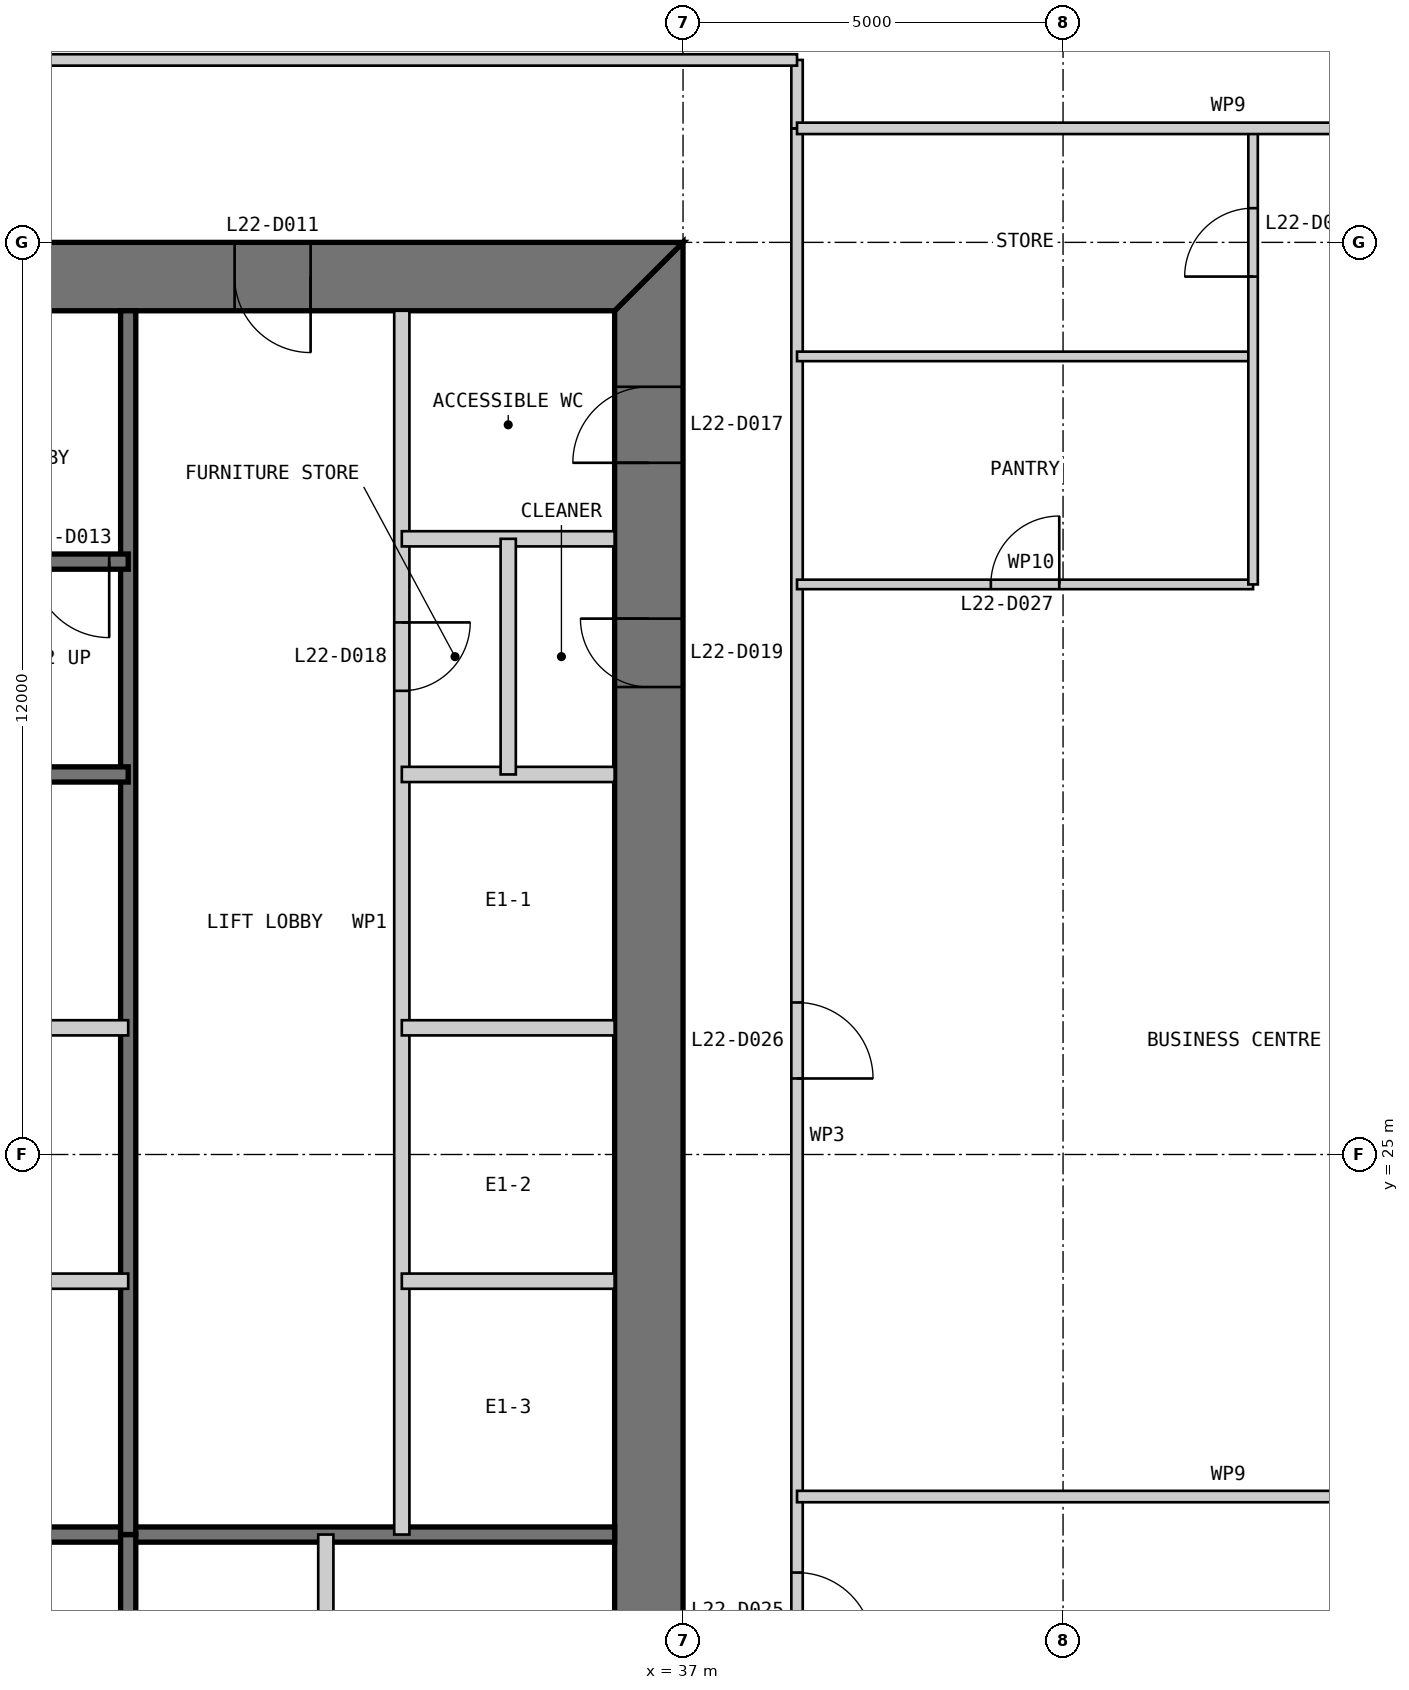
"""IFC4 building model, lengths in metres.
Left out: names, types, materials, properties, quantities, classifications, styles, units other than length and angle.
Written with IfcOpenShell. Run it as: python <this file> out.ifc"""

import sys

from ifc_helpers import new_model, si_unit, direction, frame, frame_2d, origin, place, context, subcontext, project, spatial, polyline, rectangle, outline, extrude, element, fill, save


model = new_model("IFC4")
c1 = context("Model", 3, precision=1e-05, world=origin(), true_north=direction((0.0, 1.0)))
c2 = subcontext(c1, "Body", "Model", "MODEL_VIEW")
j1 = project(units=[si_unit("LENGTHUNIT", "METRE"), si_unit("PLANEANGLEUNIT", "RADIAN")], contexts=[c1])
p1 = place(None, origin())
s1 = spatial("IfcSite", under=j1, at=p1, CompositionType="ELEMENT")
p2 = place(p1, origin())
s2 = spatial("IfcBuilding", under=s1, at=p2, CompositionType="ELEMENT")
p3 = place(p2, frame((0.0, 0.0, 97.0)))
s3 = spatial("IfcBuildingStorey", under=s2, at=p3, CompositionType="ELEMENT", Elevation=97.0)
p4 = place(p3, frame((36.55, 13.9, 0.0), z_axis=(0.0, 0.0, 1.0), x_axis=(0.0, 1.0, 0.0)))
e1 = element("IfcWall", 1, at=p4, inside=s3, PredefinedType="SHEAR", context=c2, shape_type="SweptSolid", body=[
    extrude(outline(polyline([(-0.9, -0.45), (23.1, -0.45), (22.2, 0.45), (0.0, 0.45), (-0.9, -0.45)])), origin(), (0.0, 0.0, 1.0), 5.4),
])
p5 = place(p4, frame((20.2, 0.0, 0.0)))
e2 = element("IfcOpeningElement", 2, at=p5, cuts=e1, PredefinedType="OPENING", context=c2, shape_type="SweptSolid", body=[
    extrude(rectangle(XDim=1.0, YDim=2.2, at=frame_2d((0.5, 1.1))), frame((0.0, 0.46, 0.0), z_axis=(0.0, -1.0, 0.0), x_axis=(1.0, 0.0, 0.0)), (0.0, 0.0, 1.0), 0.92),
])
p6 = place(p4, frame((17.25, 0.0, 0.0)))
e3 = element("IfcOpeningElement", 3, at=p6, cuts=e1, PredefinedType="OPENING", context=c2, shape_type="SweptSolid", body=[
    extrude(rectangle(XDim=0.9, YDim=2.2, at=frame_2d((0.45, 1.1))), frame((0.0, 0.46, 0.0), z_axis=(0.0, -1.0, 0.0), x_axis=(1.0, 0.0, 0.0)), (0.0, 0.0, 1.0), 0.92),
])
p7 = place(p3, frame((37.0, 36.55, 0.0), z_axis=(0.0, 0.0, 1.0), x_axis=(-1.0, 0.0, 0.0)))
e4 = element("IfcWall", 4, at=p7, inside=s3, PredefinedType="SHEAR", context=c2, shape_type="SweptSolid", body=[
    extrude(outline(polyline([(0.0, -0.45), (24.0, -0.45), (23.1, 0.45), (0.9, 0.45), (0.0, -0.45)])), origin(), (0.0, 0.0, 1.0), 5.4),
])
p8 = place(p7, frame((4.9, 0.0, 0.0)))
e5 = element("IfcOpeningElement", 5, at=p8, cuts=e4, PredefinedType="OPENING", context=c2, shape_type="SweptSolid", body=[
    extrude(rectangle(XDim=1.0, YDim=2.2, at=frame_2d((0.5, 1.1))), frame((0.0, 0.46, 0.0), z_axis=(0.0, -1.0, 0.0), x_axis=(1.0, 0.0, 0.0)), (0.0, 0.0, 1.0), 0.92),
])
p9 = place(p7, frame((8.9, 0.0, 0.0)))
e6 = element("IfcOpeningElement", 6, at=p9, cuts=e4, PredefinedType="OPENING", context=c2, shape_type="SweptSolid", body=[
    extrude(rectangle(XDim=1.1, YDim=2.2, at=frame_2d((0.55, 1.1))), frame((0.0, 0.46, 0.0), z_axis=(0.0, -1.0, 0.0), x_axis=(1.0, 0.0, 0.0)), (0.0, 0.0, 1.0), 0.92),
])
p10 = place(p7, frame((15.05, 0.0, 0.0)))
e7 = element("IfcOpeningElement", 7, at=p10, cuts=e4, PredefinedType="OPENING", context=c2, shape_type="SweptSolid", body=[
    extrude(rectangle(XDim=0.9, YDim=2.2, at=frame_2d((0.45, 1.1))), frame((0.0, 0.46, 0.0), z_axis=(0.0, -1.0, 0.0), x_axis=(1.0, 0.0, 0.0)), (0.0, 0.0, 1.0), 0.92),
])
p11 = place(p7, frame((17.9, 0.0, 0.0)))
e8 = element("IfcOpeningElement", 8, at=p11, cuts=e4, PredefinedType="OPENING", context=c2, shape_type="SweptSolid", body=[
    extrude(rectangle(XDim=1.0, YDim=2.2, at=frame_2d((0.5, 1.1))), frame((0.0, 0.46, 0.0), z_axis=(0.0, -1.0, 0.0), x_axis=(1.0, 0.0, 0.0)), (0.0, 0.0, 1.0), 0.92),
])
p12 = place(p7, frame((21.4, 0.0, 0.0)))
e9 = element("IfcOpeningElement", 9, at=p12, cuts=e4, PredefinedType="OPENING", context=c2, shape_type="SweptSolid", body=[
    extrude(rectangle(XDim=1.0, YDim=2.2, at=frame_2d((0.5, 1.1))), frame((0.0, 0.46, 0.0), z_axis=(0.0, -1.0, 0.0), x_axis=(1.0, 0.0, 0.0)), (0.0, 0.0, 1.0), 0.92),
])
p13 = place(p3, frame((20.3, 20.0, 0.0), z_axis=(0.0, 0.0, 1.0), x_axis=(1.0, 0.0, 0.0)))
e10 = element("IfcWall", 10, at=p13, inside=s3, PredefinedType="SOLIDWALL", context=c2, shape_type="SweptSolid", body=[
    extrude(rectangle(XDim=15.8, YDim=0.2, at=frame_2d((7.9, 0.0))), origin(), (0.0, 0.0, 1.0), 5.2),
])
p14 = place(p3, frame((29.7, 13.9, 0.0), z_axis=(0.0, 0.0, 1.0), x_axis=(0.0, 1.0, 0.0)))
e11 = element("IfcWall", 11, at=p14, inside=s3, PredefinedType="SOLIDWALL", context=c2, shape_type="SweptSolid", body=[
    extrude(rectangle(XDim=6.1, YDim=0.2, at=frame_2d((3.05, 0.0))), origin(), (0.0, 0.0, 1.0), 5.2),
])
p15 = place(p3, frame((32.3, 13.9, 0.0), z_axis=(0.0, 0.0, 1.0), x_axis=(0.0, 1.0, 0.0)))
e12 = element("IfcWall", 12, at=p15, inside=s3, PredefinedType="PARTITIONING", context=c2, shape_type="SweptSolid", body=[
    extrude(rectangle(XDim=6.1, YDim=0.2, at=frame_2d((3.05, 0.0))), origin(), (0.0, 0.0, 1.0), 5.2),
])
p16 = place(p3, frame((33.3, 36.1, 0.0), z_axis=(0.0, 0.0, 1.0), x_axis=(0.0, -1.0, 0.0)))
e13 = element("IfcWall", 13, at=p16, inside=s3, PredefinedType="PARTITIONING", context=c2, shape_type="SweptSolid", body=[
    extrude(rectangle(XDim=16.1, YDim=0.2, at=frame_2d((8.05, 0.0))), origin(), (0.0, 0.0, 1.0), 5.2),
])
p17 = place(p16, frame((4.1, 0.0, 0.0)))
e14 = element("IfcOpeningElement", 14, at=p17, cuts=e13, PredefinedType="OPENING", context=c2, shape_type="SweptSolid", body=[
    extrude(rectangle(XDim=0.9, YDim=2.2, at=frame_2d((0.45, 1.1))), frame((0.0, 0.11, 0.0), z_axis=(0.0, -1.0, 0.0), x_axis=(1.0, 0.0, 0.0)), (0.0, 0.0, 1.0), 0.22),
])
p18 = place(p3, frame((29.7, 36.1, 0.0), z_axis=(0.0, 0.0, 1.0), x_axis=(0.0, -1.0, 0.0)))
e15 = element("IfcWall", 15, at=p18, inside=s3, PredefinedType="SOLIDWALL", context=c2, shape_type="SweptSolid", body=[
    extrude(rectangle(XDim=16.1, YDim=0.2, at=frame_2d((8.05, 0.0))), origin(), (0.0, 0.0, 1.0), 5.2),
])
for number, where, z_axis, x_axis in (
    (16, (36.1, 30.0, 0.0), (0.0, 0.0, 1.0), (-1.0, 0.0, 0.0)),
    (17, (36.1, 26.667, 0.0), (0.0, 0.0, 1.0), (-1.0, 0.0, 0.0)),
    (18, (36.1, 23.333, 0.0), (0.0, 0.0, 1.0), (-1.0, 0.0, 0.0)),
    (19, (29.7, 26.667, 0.0), (0.0, 0.0, 1.0), (-1.0, 0.0, 0.0)),
    (20, (29.7, 23.333, 0.0), (0.0, 0.0, 1.0), (-1.0, 0.0, 0.0)),
):
    element("IfcWall", number, at=place(p3, frame(where, z_axis=z_axis, x_axis=x_axis)), inside=s3, PredefinedType="PARTITIONING", context=c2, shape_type="SweptSolid", body=[
        extrude(rectangle(XDim=2.8, YDim=0.2, at=frame_2d((1.4, 0.0))), origin(), (0.0, 0.0, 1.0), 5.2),
    ])
p19 = place(p3, frame((29.7, 32.8, 0.0), z_axis=(0.0, 0.0, 1.0), x_axis=(-1.0, 0.0, 0.0)))
e21 = element("IfcWall", 21, at=p19, inside=s3, PredefinedType="SOLIDWALL", context=c2, shape_type="SweptSolid", body=[
    extrude(rectangle(XDim=9.4, YDim=0.2, at=frame_2d((4.7, 0.0))), origin(), (0.0, 0.0, 1.0), 5.2),
])
p20 = place(p19, frame((0.25, 0.0, 0.0)))
e22 = element("IfcOpeningElement", 22, at=p20, cuts=e21, PredefinedType="OPENING", context=c2, shape_type="SweptSolid", body=[
    extrude(rectangle(XDim=1.0, YDim=2.2, at=frame_2d((0.5, 1.1))), frame((0.0, 0.11, 0.0), z_axis=(0.0, -1.0, 0.0), x_axis=(1.0, 0.0, 0.0)), (0.0, 0.0, 1.0), 0.22),
])
p21 = place(p3, frame((29.7, 30.0, 0.0), z_axis=(0.0, 0.0, 1.0), x_axis=(-1.0, 0.0, 0.0)))
e23 = element("IfcWall", 23, at=p21, inside=s3, PredefinedType="SOLIDWALL", context=c2, shape_type="SweptSolid", body=[
    extrude(rectangle(XDim=15.8, YDim=0.2, at=frame_2d((7.9, 0.0))), origin(), (0.0, 0.0, 1.0), 5.2),
])
p22 = place(p3, frame((36.1, 33.1, 0.0), z_axis=(0.0, 0.0, 1.0), x_axis=(-1.0, 0.0, 0.0)))
e24 = element("IfcWall", 24, at=p22, inside=s3, PredefinedType="PARTITIONING", context=c2, shape_type="SweptSolid", body=[
    extrude(rectangle(XDim=2.8, YDim=0.2, at=frame_2d((1.4, 0.0))), origin(), (0.0, 0.0, 1.0), 5.2),
])
p23 = place(p3, frame((34.7, 33.1, 0.0), z_axis=(0.0, 0.0, 1.0), x_axis=(0.0, -1.0, 0.0)))
e25 = element("IfcWall", 25, at=p23, inside=s3, PredefinedType="PARTITIONING", context=c2, shape_type="SweptSolid", body=[
    extrude(rectangle(XDim=3.1, YDim=0.2, at=frame_2d((1.55, 0.0))), origin(), (0.0, 0.0, 1.0), 5.2),
])
p24 = place(p3, frame((38.5, 11.5, 0.0), z_axis=(0.0, 0.0, 1.0), x_axis=(0.0, 1.0, 0.0)))
e26 = element("IfcWall", 26, at=p24, inside=s3, PredefinedType="PARTITIONING", context=c2, shape_type="SweptSolid", body=[
    extrude(rectangle(XDim=27.0, YDim=0.15, at=frame_2d((13.5, 0.0))), origin(), (0.0, 0.0, 1.0), 5.25),
])
p25 = place(p24, frame((3.25, 0.0, 0.0)))
e27 = element("IfcOpeningElement", 27, at=p25, cuts=e26, PredefinedType="OPENING", context=c2, shape_type="SweptSolid", body=[
    extrude(rectangle(XDim=1.0, YDim=2.2, at=frame_2d((0.5, 1.1))), frame((0.0, 0.085, 0.0), z_axis=(0.0, -1.0, 0.0), x_axis=(1.0, 0.0, 0.0)), (0.0, 0.0, 1.0), 0.17),
])
p26 = place(p24, frame((7.0, 0.0, 0.0)))
e28 = element("IfcOpeningElement", 28, at=p26, cuts=e26, PredefinedType="OPENING", context=c2, shape_type="SweptSolid", body=[
    extrude(rectangle(XDim=1.0, YDim=2.2, at=frame_2d((0.5, 1.1))), frame((0.0, 0.085, 0.0), z_axis=(0.0, -1.0, 0.0), x_axis=(1.0, 0.0, 0.0)), (0.0, 0.0, 1.0), 0.17),
])
p27 = place(p24, frame((14.5, 0.0, 0.0)))
e29 = element("IfcOpeningElement", 29, at=p27, cuts=e26, PredefinedType="OPENING", context=c2, shape_type="SweptSolid", body=[
    extrude(rectangle(XDim=1.0, YDim=2.2, at=frame_2d((0.5, 1.1))), frame((0.0, 0.085, 0.0), z_axis=(0.0, -1.0, 0.0), x_axis=(1.0, 0.0, 0.0)), (0.0, 0.0, 1.0), 0.17),
])
p28 = place(p3, frame((49.85, 20.5, 0.0), z_axis=(0.0, 0.0, 1.0), x_axis=(-1.0, 0.0, 0.0)))
e30 = element("IfcWall", 30, at=p28, inside=s3, PredefinedType="PARTITIONING", context=c2, shape_type="SweptSolid", body=[
    extrude(rectangle(XDim=11.35, YDim=0.15, at=frame_2d((5.675, 0.0))), origin(), (0.0, 0.0, 1.0), 5.25),
])
p29 = place(p3, frame((44.5, 32.5, 0.0), z_axis=(0.0, 0.0, 1.0), x_axis=(-1.0, 0.0, 0.0)))
e31 = element("IfcWall", 31, at=p29, inside=s3, PredefinedType="PARTITIONING", context=c2, shape_type="SweptSolid", body=[
    extrude(rectangle(XDim=6.0, YDim=0.125, at=frame_2d((3.0, 0.0))), origin(), (0.0, 0.0, 1.0), 5.25),
])
p30 = place(p29, frame((2.55, 0.0, 0.0)))
e32 = element("IfcOpeningElement", 32, at=p30, cuts=e31, PredefinedType="OPENING", context=c2, shape_type="SweptSolid", body=[
    extrude(rectangle(XDim=0.9, YDim=2.2, at=frame_2d((0.45, 1.1))), frame((0.0, 0.073, 0.0), z_axis=(0.0, -1.0, 0.0), x_axis=(1.0, 0.0, 0.0)), (0.0, 0.0, 1.0), 0.145),
])
p31 = place(p3, frame((44.5, 35.5, 0.0), z_axis=(0.0, 0.0, 1.0), x_axis=(-1.0, 0.0, 0.0)))
e33 = element("IfcWall", 33, at=p31, inside=s3, PredefinedType="PARTITIONING", context=c2, shape_type="SweptSolid", body=[
    extrude(rectangle(XDim=6.0, YDim=0.125, at=frame_2d((3.0, 0.0))), origin(), (0.0, 0.0, 1.0), 5.25),
])
p32 = place(p3, frame((44.5, 32.5, 0.0), z_axis=(0.0, 0.0, 1.0), x_axis=(0.0, 1.0, 0.0)))
e34 = element("IfcWall", 34, at=p32, inside=s3, PredefinedType="PARTITIONING", context=c2, shape_type="SweptSolid", body=[
    extrude(rectangle(XDim=6.0, YDim=0.125, at=frame_2d((3.0, 0.0))), origin(), (0.0, 0.0, 1.0), 5.25),
])
p33 = place(p32, frame((4.05, 0.0, 0.0)))
e35 = element("IfcOpeningElement", 35, at=p33, cuts=e34, PredefinedType="OPENING", context=c2, shape_type="SweptSolid", body=[
    extrude(rectangle(XDim=0.9, YDim=2.2, at=frame_2d((0.45, 1.1))), frame((0.0, 0.073, 0.0), z_axis=(0.0, -1.0, 0.0), x_axis=(1.0, 0.0, 0.0)), (0.0, 0.0, 1.0), 0.145),
])
p34 = place(p3, frame((38.5, 38.5, 0.0), z_axis=(0.0, 0.0, 1.0), x_axis=(0.0, 1.0, 0.0)))
e36 = element("IfcWall", 36, at=p34, inside=s3, PredefinedType="PARTITIONING", context=c2, shape_type="SweptSolid", body=[
    extrude(rectangle(XDim=0.9, YDim=0.15, at=frame_2d((0.45, 0.0))), origin(), (0.0, 0.0, 1.0), 5.25),
])
p35 = place(p3, frame((38.5, 39.4, 0.0), z_axis=(0.0, 0.0, 1.0), x_axis=(-1.0, 0.0, 0.0)))
e37 = element("IfcWall", 37, at=p35, inside=s3, PredefinedType="PARTITIONING", context=c2, shape_type="SweptSolid", body=[
    extrude(rectangle(XDim=27.0, YDim=0.15, at=frame_2d((13.5, 0.0))), origin(), (0.0, 0.0, 1.0), 5.25),
])
p36 = place(p35, frame((11.5, 0.0, 0.0)))
e38 = element("IfcOpeningElement", 38, at=p36, cuts=e37, PredefinedType="OPENING", context=c2, shape_type="SweptSolid", body=[
    extrude(rectangle(XDim=1.0, YDim=2.2, at=frame_2d((0.5, 1.1))), frame((0.0, 0.085, 0.0), z_axis=(0.0, -1.0, 0.0), x_axis=(1.0, 0.0, 0.0)), (0.0, 0.0, 1.0), 0.17),
])
p37 = place(p3, frame((49.85, 38.5, 0.0), z_axis=(0.0, 0.0, 1.0), x_axis=(-1.0, 0.0, 0.0)))
e39 = element("IfcWall", 39, at=p37, inside=s3, PredefinedType="PARTITIONING", context=c2, shape_type="SweptSolid", body=[
    extrude(rectangle(XDim=11.35, YDim=0.15, at=frame_2d((5.675, 0.0))), origin(), (0.0, 0.0, 1.0), 5.25),
])
p38 = place(p8, origin())
e40 = element("IfcDoor", 40, at=p38, inside=s3, OperationType="SINGLE_SWING_LEFT", PredefinedType="DOOR", context=c2, shape_type="SweptSolid", body=[
    extrude(rectangle(XDim=1.0, YDim=2.2, at=frame_2d((0.5, 1.1))), frame((0.0, 0.025, 0.0), z_axis=(0.0, -1.0, 0.0), x_axis=(1.0, 0.0, 0.0)), (0.0, 0.0, 1.0), 0.05),
    extrude(outline(polyline([(0.0, 0.0), (0.04, 0.0), (0.04, 2.16), (0.96, 2.16), (0.96, 0.0), (1.0, 0.0), (1.0, 2.2), (0.0, 2.2), (0.0, 0.0)])), frame((0.0, 0.3, 0.0), z_axis=(0.0, -1.0, 0.0), x_axis=(1.0, 0.0, 0.0)), (0.0, 0.0, 1.0), 0.6),
])
fill(e5, e40)
p39 = place(p20, origin())
e41 = element("IfcDoor", 41, at=p39, inside=s3, OperationType="SINGLE_SWING_LEFT", PredefinedType="DOOR", context=c2, shape_type="SweptSolid", body=[
    extrude(rectangle(XDim=1.0, YDim=2.2, at=frame_2d((0.5, 1.1))), frame((0.0, 0.025, 0.0), z_axis=(0.0, -1.0, 0.0), x_axis=(1.0, 0.0, 0.0)), (0.0, 0.0, 1.0), 0.05),
])
fill(e22, e41)
p40 = place(p5, origin())
e42 = element("IfcDoor", 42, at=p40, inside=s3, OperationType="SINGLE_SWING_LEFT", PredefinedType="DOOR", context=c2, shape_type="SweptSolid", body=[
    extrude(rectangle(XDim=1.0, YDim=2.2, at=frame_2d((0.5, 1.1))), frame((0.0, 0.025, 0.0), z_axis=(0.0, -1.0, 0.0), x_axis=(1.0, 0.0, 0.0)), (0.0, 0.0, 1.0), 0.05),
    extrude(outline(polyline([(0.0, 0.0), (0.04, 0.0), (0.04, 2.16), (0.96, 2.16), (0.96, 0.0), (1.0, 0.0), (1.0, 2.2), (0.0, 2.2), (0.0, 0.0)])), frame((0.0, 0.3, 0.0), z_axis=(0.0, -1.0, 0.0), x_axis=(1.0, 0.0, 0.0)), (0.0, 0.0, 1.0), 0.6),
])
fill(e2, e42)
p41 = place(p17, origin())
e43 = element("IfcDoor", 43, at=p41, inside=s3, OperationType="SINGLE_SWING_LEFT", PredefinedType="DOOR", context=c2, shape_type="SweptSolid", body=[
    extrude(rectangle(XDim=0.9, YDim=2.2, at=frame_2d((0.45, 1.1))), frame((0.0, 0.025, 0.0), z_axis=(0.0, -1.0, 0.0), x_axis=(1.0, 0.0, 0.0)), (0.0, 0.0, 1.0), 0.05),
])
fill(e14, e43)
p42 = place(p6, origin())
e44 = element("IfcDoor", 44, at=p42, inside=s3, OperationType="SINGLE_SWING_RIGHT", PredefinedType="DOOR", context=c2, shape_type="SweptSolid", body=[
    extrude(rectangle(XDim=0.9, YDim=2.2, at=frame_2d((0.45, 1.1))), frame((0.0, 0.025, 0.0), z_axis=(0.0, -1.0, 0.0), x_axis=(1.0, 0.0, 0.0)), (0.0, 0.0, 1.0), 0.05),
    extrude(outline(polyline([(0.0, 0.0), (0.04, 0.0), (0.04, 2.16), (0.86, 2.16), (0.86, 0.0), (0.9, 0.0), (0.9, 2.2), (0.0, 2.2), (0.0, 0.0)])), frame((0.0, 0.3, 0.0), z_axis=(0.0, -1.0, 0.0), x_axis=(1.0, 0.0, 0.0)), (0.0, 0.0, 1.0), 0.6),
])
fill(e3, e44)
p43 = place(p26, frame((1.0, 0.0, 0.0), z_axis=(0.0, 0.0, 1.0), x_axis=(-1.0, 0.0, 0.0)))
e45 = element("IfcDoor", 45, at=p43, inside=s3, OperationType="SINGLE_SWING_RIGHT", PredefinedType="DOOR", context=c2, shape_type="SweptSolid", body=[
    extrude(rectangle(XDim=1.0, YDim=2.2, at=frame_2d((0.5, 1.1))), frame((0.0, 0.025, 0.0), z_axis=(0.0, -1.0, 0.0), x_axis=(1.0, 0.0, 0.0)), (0.0, 0.0, 1.0), 0.05),
])
fill(e28, e45)
p44 = place(p27, frame((1.0, 0.0, 0.0), z_axis=(0.0, 0.0, 1.0), x_axis=(-1.0, 0.0, 0.0)))
e46 = element("IfcDoor", 46, at=p44, inside=s3, OperationType="SINGLE_SWING_RIGHT", PredefinedType="DOOR", context=c2, shape_type="SweptSolid", body=[
    extrude(rectangle(XDim=1.0, YDim=2.2, at=frame_2d((0.5, 1.1))), frame((0.0, 0.025, 0.0), z_axis=(0.0, -1.0, 0.0), x_axis=(1.0, 0.0, 0.0)), (0.0, 0.0, 1.0), 0.05),
])
fill(e29, e46)
p45 = place(p30, frame((0.9, 0.0, 0.0), z_axis=(0.0, 0.0, 1.0), x_axis=(-1.0, 0.0, 0.0)))
e47 = element("IfcDoor", 47, at=p45, inside=s3, OperationType="SINGLE_SWING_RIGHT", PredefinedType="DOOR", context=c2, shape_type="SweptSolid", body=[
    extrude(rectangle(XDim=0.9, YDim=2.2, at=frame_2d((0.45, 1.1))), frame((0.0, 0.025, 0.0), z_axis=(0.0, -1.0, 0.0), x_axis=(1.0, 0.0, 0.0)), (0.0, 0.0, 1.0), 0.05),
])
fill(e32, e47)
p46 = place(p33, origin())
e48 = element("IfcDoor", 48, at=p46, inside=s3, OperationType="SINGLE_SWING_LEFT", PredefinedType="DOOR", context=c2, shape_type="SweptSolid", body=[
    extrude(rectangle(XDim=0.9, YDim=2.2, at=frame_2d((0.45, 1.1))), frame((0.0, 0.025, 0.0), z_axis=(0.0, -1.0, 0.0), x_axis=(1.0, 0.0, 0.0)), (0.0, 0.0, 1.0), 0.05),
])
fill(e35, e48)
save(model, sys.argv[1])
